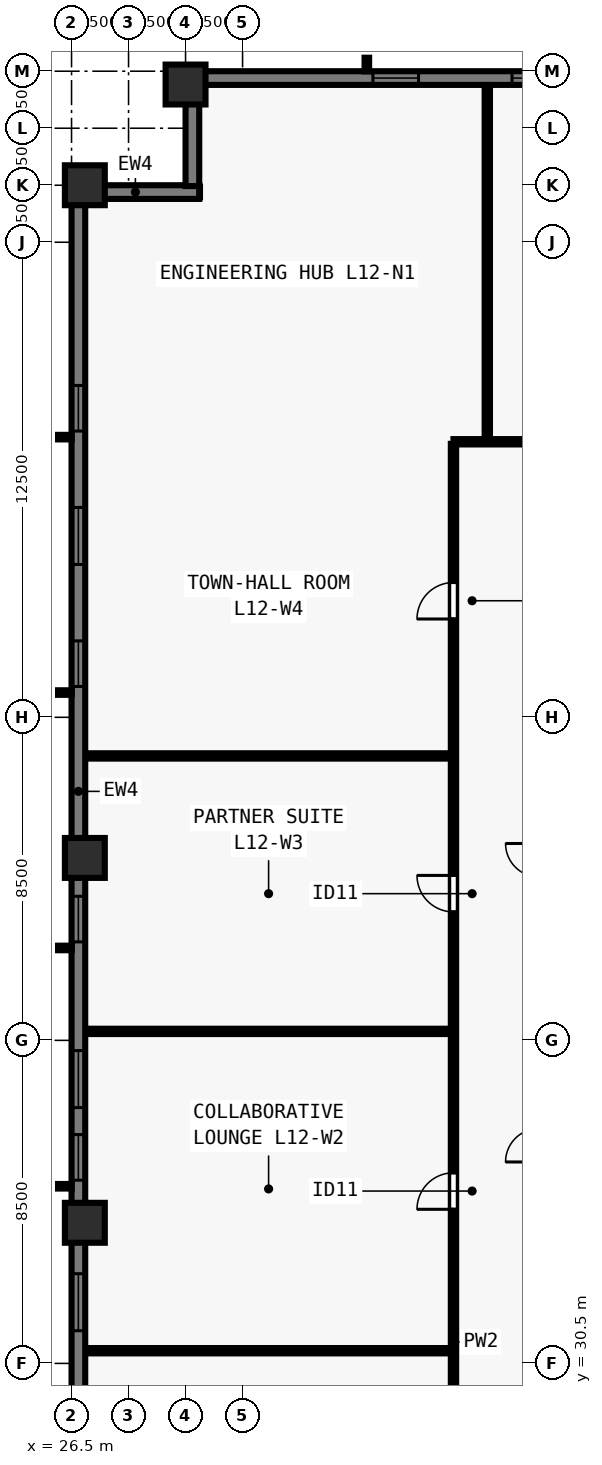
"""IFC4 building model, lengths in metres.
Left out: names, types, materials, properties, quantities, classifications, styles, units other than length and angle.
Written with IfcOpenShell. Run it as: python <this file> out.ifc"""

import sys

from ifc_helpers import new_model, si_unit, direction, frame, frame_2d, origin, origin_2d, place, context, subcontext, project, spatial, rectangle, extrude, element, fill, save


model = new_model("IFC4")
c1 = context("Model", 3, precision=1e-05, world=origin(), true_north=direction((0.0, 1.0)))
c2 = subcontext(c1, "Body", "Model", "MODEL_VIEW")
j1 = project(units=[si_unit("LENGTHUNIT", "METRE"), si_unit("PLANEANGLEUNIT", "RADIAN")], contexts=[c1])
p1 = place(None, origin())
s1 = spatial("IfcSite", under=j1, at=p1, CompositionType="ELEMENT")
p2 = place(p1, origin())
s2 = spatial("IfcBuilding", under=s1, at=p2, CompositionType="ELEMENT")
p3 = place(p2, frame((0.0, 0.0, 48.0)))
s3 = spatial("IfcBuildingStorey", under=s2, at=p3, CompositionType="ELEMENT", Elevation=48.0)
for number, where, z_axis, x_axis in (
    (1, (29.5, 64.15, 0.0), (0.0, 0.0, 1.0), (1.0, 0.0, 0.0)),
    (2, (26.85, 61.5, 0.0), (0.0, 0.0, 1.0), (0.0, 1.0, 0.0)),
    (3, (26.85, 43.8, 0.0), (0.0, 0.0, 1.0), (0.0, 1.0, 0.0)),
    (4, (26.85, 34.2, 0.0), (0.0, 0.0, 1.0), (0.0, 1.0, 0.0)),
):
    element("IfcColumn", number, at=place(p3, frame(where, z_axis=z_axis, x_axis=x_axis)), inside=s3, PredefinedType="COLUMN", context=c2, shape_type="SweptSolid", body=[
        extrude(rectangle(XDim=1.05, YDim=1.05, at=origin_2d()), origin(), (0.0, 0.0, 1.0), 3.5),
    ])
p4 = place(p3, frame((26.68, 16.5, 0.0), z_axis=(0.0, 0.0, 1.0), x_axis=(0.0, 1.0, 0.0)))
e5 = element("IfcWall", 5, at=p4, inside=s3, PredefinedType="SOLIDWALL", context=c2, shape_type="SweptSolid", body=[
    extrude(rectangle(XDim=44.662, YDim=0.36, at=frame_2d((22.331, 0.0))), origin(), (0.0, 0.0, 1.0), 3.28),
])
p5 = place(p4, frame((4.93, 0.0, 0.8)))
e6 = element("IfcOpeningElement", 6, at=p5, cuts=e5, PredefinedType="OPENING", context=c2, shape_type="SweptSolid", body=[
    extrude(rectangle(XDim=1.2, YDim=1.544, at=frame_2d((0.6, 0.772))), frame((0.0, 0.19, 0.0), z_axis=(0.0, -1.0, 0.0), x_axis=(1.0, 0.0, 0.0)), (0.0, 0.0, 1.0), 0.38),
])
p6 = place(p4, frame((8.14, 0.0, 0.8)))
e7 = element("IfcOpeningElement", 7, at=p6, cuts=e5, PredefinedType="OPENING", context=c2, shape_type="SweptSolid", body=[
    extrude(rectangle(XDim=1.5, YDim=1.544, at=frame_2d((0.75, 0.772))), frame((0.0, 0.19, 0.0), z_axis=(0.0, -1.0, 0.0), x_axis=(1.0, 0.0, 0.0)), (0.0, 0.0, 1.0), 0.38),
])
p7 = place(p4, frame((11.65, 0.0, 0.8)))
e8 = element("IfcOpeningElement", 8, at=p7, cuts=e5, PredefinedType="OPENING", context=c2, shape_type="SweptSolid", body=[
    extrude(rectangle(XDim=1.2, YDim=1.544, at=frame_2d((0.6, 0.772))), frame((0.0, 0.19, 0.0), z_axis=(0.0, -1.0, 0.0), x_axis=(1.0, 0.0, 0.0)), (0.0, 0.0, 1.0), 0.38),
])
p8 = place(p4, frame((14.861, 0.0, 0.8)))
e9 = element("IfcOpeningElement", 9, at=p8, cuts=e5, PredefinedType="OPENING", context=c2, shape_type="SweptSolid", body=[
    extrude(rectangle(XDim=1.5, YDim=1.544, at=frame_2d((0.75, 0.772))), frame((0.0, 0.19, 0.0), z_axis=(0.0, -1.0, 0.0), x_axis=(1.0, 0.0, 0.0)), (0.0, 0.0, 1.0), 0.38),
])
p9 = place(p4, frame((18.821, 0.0, 0.8)))
e10 = element("IfcOpeningElement", 10, at=p9, cuts=e5, PredefinedType="OPENING", context=c2, shape_type="SweptSolid", body=[
    extrude(rectangle(XDim=1.2, YDim=1.544, at=frame_2d((0.6, 0.772))), frame((0.0, 0.19, 0.0), z_axis=(0.0, -1.0, 0.0), x_axis=(1.0, 0.0, 0.0)), (0.0, 0.0, 1.0), 0.38),
])
p10 = place(p4, frame((20.731, 0.0, 0.8)))
e11 = element("IfcOpeningElement", 11, at=p10, cuts=e5, PredefinedType="OPENING", context=c2, shape_type="SweptSolid", body=[
    extrude(rectangle(XDim=1.5, YDim=1.544, at=frame_2d((0.75, 0.772))), frame((0.0, 0.19, 0.0), z_axis=(0.0, -1.0, 0.0), x_axis=(1.0, 0.0, 0.0)), (0.0, 0.0, 1.0), 0.38),
])
p11 = place(p4, frame((25.091, 0.0, 0.8)))
e12 = element("IfcOpeningElement", 12, at=p11, cuts=e5, PredefinedType="OPENING", context=c2, shape_type="SweptSolid", body=[
    extrude(rectangle(XDim=1.2, YDim=1.544, at=frame_2d((0.6, 0.772))), frame((0.0, 0.19, 0.0), z_axis=(0.0, -1.0, 0.0), x_axis=(1.0, 0.0, 0.0)), (0.0, 0.0, 1.0), 0.38),
])
p12 = place(p4, frame((31.812, 0.0, 0.8)))
e13 = element("IfcOpeningElement", 13, at=p12, cuts=e5, PredefinedType="OPENING", context=c2, shape_type="SweptSolid", body=[
    extrude(rectangle(XDim=1.2, YDim=1.544, at=frame_2d((0.6, 0.772))), frame((0.0, 0.19, 0.0), z_axis=(0.0, -1.0, 0.0), x_axis=(1.0, 0.0, 0.0)), (0.0, 0.0, 1.0), 0.38),
])
p13 = place(p4, frame((35.022, 0.0, 0.8)))
e14 = element("IfcOpeningElement", 14, at=p13, cuts=e5, PredefinedType="OPENING", context=c2, shape_type="SweptSolid", body=[
    extrude(rectangle(XDim=1.5, YDim=1.544, at=frame_2d((0.75, 0.772))), frame((0.0, 0.19, 0.0), z_axis=(0.0, -1.0, 0.0), x_axis=(1.0, 0.0, 0.0)), (0.0, 0.0, 1.0), 0.38),
])
p14 = place(p4, frame((38.532, 0.0, 0.8)))
e15 = element("IfcOpeningElement", 15, at=p14, cuts=e5, PredefinedType="OPENING", context=c2, shape_type="SweptSolid", body=[
    extrude(rectangle(XDim=1.2, YDim=1.544, at=frame_2d((0.6, 0.772))), frame((0.0, 0.19, 0.0), z_axis=(0.0, -1.0, 0.0), x_axis=(1.0, 0.0, 0.0)), (0.0, 0.0, 1.0), 0.38),
])
p15 = place(p3, frame((26.5, 61.32, 0.0), z_axis=(0.0, 0.0, 1.0), x_axis=(1.0, 0.0, 0.0)))
e16 = element("IfcWall", 16, at=p15, inside=s3, PredefinedType="SOLIDWALL", context=c2, shape_type="SweptSolid", body=[
    extrude(rectangle(XDim=3.36, YDim=0.36, at=frame_2d((1.68, 0.0))), origin(), (0.0, 0.0, 1.0), 3.28),
])
p16 = place(p3, frame((29.68, 61.478, 0.0), z_axis=(0.0, 0.0, 1.0), x_axis=(0.0, 1.0, 0.0)))
e17 = element("IfcWall", 17, at=p16, inside=s3, PredefinedType="SOLIDWALL", context=c2, shape_type="SweptSolid", body=[
    extrude(rectangle(XDim=2.684, YDim=0.36, at=frame_2d((1.342, 0.0))), origin(), (0.0, 0.0, 1.0), 3.28),
])
p17 = place(p3, frame((29.5, 64.32, 0.0), z_axis=(0.0, 0.0, 1.0), x_axis=(1.0, 0.0, 0.0)))
e18 = element("IfcWall", 18, at=p17, inside=s3, PredefinedType="SOLIDWALL", context=c2, shape_type="SweptSolid", body=[
    extrude(rectangle(XDim=44.662, YDim=0.36, at=frame_2d((22.331, 0.0))), origin(), (0.0, 0.0, 1.0), 3.28),
])
p18 = place(p17, frame((4.93, 0.0, 0.8)))
e19 = element("IfcOpeningElement", 19, at=p18, cuts=e18, PredefinedType="OPENING", context=c2, shape_type="SweptSolid", body=[
    extrude(rectangle(XDim=1.2, YDim=1.544, at=frame_2d((0.6, 0.772))), frame((0.0, 0.19, 0.0), z_axis=(0.0, -1.0, 0.0), x_axis=(1.0, 0.0, 0.0)), (0.0, 0.0, 1.0), 0.38),
])
p19 = place(p17, frame((8.59, 0.0, 0.8)))
e20 = element("IfcOpeningElement", 20, at=p19, cuts=e18, PredefinedType="OPENING", context=c2, shape_type="SweptSolid", body=[
    extrude(rectangle(XDim=1.5, YDim=1.544, at=frame_2d((0.75, 0.772))), frame((0.0, 0.19, 0.0), z_axis=(0.0, -1.0, 0.0), x_axis=(1.0, 0.0, 0.0)), (0.0, 0.0, 1.0), 0.38),
])
p20 = place(p17, frame((11.65, 0.0, 0.8)))
e21 = element("IfcOpeningElement", 21, at=p20, cuts=e18, PredefinedType="OPENING", context=c2, shape_type="SweptSolid", body=[
    extrude(rectangle(XDim=1.2, YDim=1.544, at=frame_2d((0.6, 0.772))), frame((0.0, 0.19, 0.0), z_axis=(0.0, -1.0, 0.0), x_axis=(1.0, 0.0, 0.0)), (0.0, 0.0, 1.0), 0.38),
])
p21 = place(p17, frame((14.861, 0.0, 0.8)))
e22 = element("IfcOpeningElement", 22, at=p21, cuts=e18, PredefinedType="OPENING", context=c2, shape_type="SweptSolid", body=[
    extrude(rectangle(XDim=1.5, YDim=1.544, at=frame_2d((0.75, 0.772))), frame((0.0, 0.19, 0.0), z_axis=(0.0, -1.0, 0.0), x_axis=(1.0, 0.0, 0.0)), (0.0, 0.0, 1.0), 0.38),
])
p22 = place(p17, frame((18.821, 0.0, 0.8)))
e23 = element("IfcOpeningElement", 23, at=p22, cuts=e18, PredefinedType="OPENING", context=c2, shape_type="SweptSolid", body=[
    extrude(rectangle(XDim=1.2, YDim=1.544, at=frame_2d((0.6, 0.772))), frame((0.0, 0.19, 0.0), z_axis=(0.0, -1.0, 0.0), x_axis=(1.0, 0.0, 0.0)), (0.0, 0.0, 1.0), 0.38),
])
p23 = place(p17, frame((21.581, 0.0, 0.8)))
e24 = element("IfcOpeningElement", 24, at=p23, cuts=e18, PredefinedType="OPENING", context=c2, shape_type="SweptSolid", body=[
    extrude(rectangle(XDim=1.5, YDim=1.544, at=frame_2d((0.75, 0.772))), frame((0.0, 0.19, 0.0), z_axis=(0.0, -1.0, 0.0), x_axis=(1.0, 0.0, 0.0)), (0.0, 0.0, 1.0), 0.38),
])
p24 = place(p17, frame((25.091, 0.0, 0.8)))
e25 = element("IfcOpeningElement", 25, at=p24, cuts=e18, PredefinedType="OPENING", context=c2, shape_type="SweptSolid", body=[
    extrude(rectangle(XDim=1.2, YDim=1.544, at=frame_2d((0.6, 0.772))), frame((0.0, 0.19, 0.0), z_axis=(0.0, -1.0, 0.0), x_axis=(1.0, 0.0, 0.0)), (0.0, 0.0, 1.0), 0.38),
])
p25 = place(p17, frame((28.751, 0.0, 0.8)))
e26 = element("IfcOpeningElement", 26, at=p25, cuts=e18, PredefinedType="OPENING", context=c2, shape_type="SweptSolid", body=[
    extrude(rectangle(XDim=1.5, YDim=1.544, at=frame_2d((0.75, 0.772))), frame((0.0, 0.19, 0.0), z_axis=(0.0, -1.0, 0.0), x_axis=(1.0, 0.0, 0.0)), (0.0, 0.0, 1.0), 0.38),
])
p26 = place(p17, frame((31.812, 0.0, 0.8)))
e27 = element("IfcOpeningElement", 27, at=p26, cuts=e18, PredefinedType="OPENING", context=c2, shape_type="SweptSolid", body=[
    extrude(rectangle(XDim=1.2, YDim=1.544, at=frame_2d((0.6, 0.772))), frame((0.0, 0.19, 0.0), z_axis=(0.0, -1.0, 0.0), x_axis=(1.0, 0.0, 0.0)), (0.0, 0.0, 1.0), 0.38),
])
p27 = place(p17, frame((35.022, 0.0, 0.8)))
e28 = element("IfcOpeningElement", 28, at=p27, cuts=e18, PredefinedType="OPENING", context=c2, shape_type="SweptSolid", body=[
    extrude(rectangle(XDim=1.5, YDim=1.544, at=frame_2d((0.75, 0.772))), frame((0.0, 0.19, 0.0), z_axis=(0.0, -1.0, 0.0), x_axis=(1.0, 0.0, 0.0)), (0.0, 0.0, 1.0), 0.38),
])
p28 = place(p17, frame((38.532, 0.0, 0.8)))
e29 = element("IfcOpeningElement", 29, at=p28, cuts=e18, PredefinedType="OPENING", context=c2, shape_type="SweptSolid", body=[
    extrude(rectangle(XDim=1.2, YDim=1.544, at=frame_2d((0.6, 0.772))), frame((0.0, 0.19, 0.0), z_axis=(0.0, -1.0, 0.0), x_axis=(1.0, 0.0, 0.0)), (0.0, 0.0, 1.0), 0.38),
])
p29 = place(p3, frame((36.55, 54.75, 0.0), z_axis=(0.0, 0.0, 1.0), x_axis=(1.0, 0.0, 0.0)))
e30 = element("IfcWall", 30, at=p29, inside=s3, PredefinedType="PARTITIONING", context=c2, shape_type="SweptSolid", body=[
    extrude(rectangle(XDim=30.9, YDim=0.14, at=frame_2d((15.45, 0.0))), origin(), (0.0, 0.0, 1.0), 3.28),
])
p30 = place(p29, frame((3.69, 0.0, 0.0)))
e31 = element("IfcOpeningElement", 31, at=p30, cuts=e30, PredefinedType="OPENING", context=c2, shape_type="SweptSolid", body=[
    extrude(rectangle(XDim=0.96, YDim=2.12, at=frame_2d((0.48, 1.06))), frame((0.0, 0.08, 0.0), z_axis=(0.0, -1.0, 0.0), x_axis=(1.0, 0.0, 0.0)), (0.0, 0.0, 1.0), 0.16),
])
p31 = place(p29, frame((5.013, 0.0, 0.0)))
e32 = element("IfcOpeningElement", 32, at=p31, cuts=e30, PredefinedType="OPENING", context=c2, shape_type="SweptSolid", body=[
    extrude(rectangle(XDim=0.96, YDim=2.12, at=frame_2d((0.48, 1.06))), frame((0.0, 0.08, 0.0), z_axis=(0.0, -1.0, 0.0), x_axis=(1.0, 0.0, 0.0)), (0.0, 0.0, 1.0), 0.16),
])
p32 = place(p29, frame((15.045, 0.0, 0.0)))
e33 = element("IfcOpeningElement", 33, at=p32, cuts=e30, PredefinedType="OPENING", context=c2, shape_type="SweptSolid", body=[
    extrude(rectangle(XDim=0.96, YDim=2.12, at=frame_2d((0.48, 1.06))), frame((0.0, 0.08, 0.0), z_axis=(0.0, -1.0, 0.0), x_axis=(1.0, 0.0, 0.0)), (0.0, 0.0, 1.0), 0.16),
])
p33 = place(p29, frame((25.077, 0.0, 0.0)))
e34 = element("IfcOpeningElement", 34, at=p33, cuts=e30, PredefinedType="OPENING", context=c2, shape_type="SweptSolid", body=[
    extrude(rectangle(XDim=0.96, YDim=2.12, at=frame_2d((0.48, 1.06))), frame((0.0, 0.08, 0.0), z_axis=(0.0, -1.0, 0.0), x_axis=(1.0, 0.0, 0.0)), (0.0, 0.0, 1.0), 0.16),
])
p34 = place(p29, frame((28.92, 0.0, 0.0)))
e35 = element("IfcOpeningElement", 35, at=p34, cuts=e30, PredefinedType="OPENING", context=c2, shape_type="SweptSolid", body=[
    extrude(rectangle(XDim=0.96, YDim=2.12, at=frame_2d((0.48, 1.06))), frame((0.0, 0.08, 0.0), z_axis=(0.0, -1.0, 0.0), x_axis=(1.0, 0.0, 0.0)), (0.0, 0.0, 1.0), 0.16),
])
p35 = place(p3, frame((36.55, 23.305, 0.0), z_axis=(0.0, 0.0, 1.0), x_axis=(0.0, 1.0, 0.0)))
e36 = element("IfcWall", 36, at=p35, inside=s3, PredefinedType="PARTITIONING", context=c2, shape_type="SweptSolid", body=[
    extrude(rectangle(XDim=31.39, YDim=0.14, at=frame_2d((15.695, 0.0))), origin(), (0.0, 0.0, 1.0), 3.28),
])
p36 = place(p35, frame((3.307, 0.0, 0.0)))
e37 = element("IfcOpeningElement", 37, at=p36, cuts=e36, PredefinedType="OPENING", context=c2, shape_type="SweptSolid", body=[
    extrude(rectangle(XDim=0.96, YDim=2.12, at=frame_2d((0.48, 1.06))), frame((0.0, 0.08, 0.0), z_axis=(0.0, -1.0, 0.0), x_axis=(1.0, 0.0, 0.0)), (0.0, 0.0, 1.0), 0.16),
])
p37 = place(p35, frame((11.25, 0.0, 0.0)))
e38 = element("IfcOpeningElement", 38, at=p37, cuts=e36, PredefinedType="OPENING", context=c2, shape_type="SweptSolid", body=[
    extrude(rectangle(XDim=0.96, YDim=2.12, at=frame_2d((0.48, 1.06))), frame((0.0, 0.08, 0.0), z_axis=(0.0, -1.0, 0.0), x_axis=(1.0, 0.0, 0.0)), (0.0, 0.0, 1.0), 0.16),
])
p38 = place(p35, frame((19.075, 0.0, 0.0)))
e39 = element("IfcOpeningElement", 39, at=p38, cuts=e36, PredefinedType="OPENING", context=c2, shape_type="SweptSolid", body=[
    extrude(rectangle(XDim=0.96, YDim=2.12, at=frame_2d((0.48, 1.06))), frame((0.0, 0.08, 0.0), z_axis=(0.0, -1.0, 0.0), x_axis=(1.0, 0.0, 0.0)), (0.0, 0.0, 1.0), 0.16),
])
p39 = place(p35, frame((26.782, 0.0, 0.0)))
e40 = element("IfcOpeningElement", 40, at=p39, cuts=e36, PredefinedType="OPENING", context=c2, shape_type="SweptSolid", body=[
    extrude(rectangle(XDim=0.96, YDim=2.12, at=frame_2d((0.48, 1.06))), frame((0.0, 0.08, 0.0), z_axis=(0.0, -1.0, 0.0), x_axis=(1.0, 0.0, 0.0)), (0.0, 0.0, 1.0), 0.16),
])
p40 = place(p3, frame((37.439, 54.85, 0.0), z_axis=(0.0, 0.0, 1.0), x_axis=(0.0, 1.0, 0.0)))
e41 = element("IfcWall", 41, at=p40, inside=s3, PredefinedType="PARTITIONING", context=c2, shape_type="SweptSolid", body=[
    extrude(rectangle(XDim=9.23, YDim=0.14, at=frame_2d((4.615, 0.0))), origin(), (0.0, 0.0, 1.0), 3.28),
])
p41 = place(p3, frame((26.92, 30.834, 0.0), z_axis=(0.0, 0.0, 1.0), x_axis=(1.0, 0.0, 0.0)))
e42 = element("IfcWall", 42, at=p41, inside=s3, PredefinedType="PARTITIONING", context=c2, shape_type="SweptSolid", body=[
    extrude(rectangle(XDim=9.53, YDim=0.14, at=frame_2d((4.765, 0.0))), origin(), (0.0, 0.0, 1.0), 3.28),
])
p42 = place(p3, frame((26.92, 39.236, 0.0), z_axis=(0.0, 0.0, 1.0), x_axis=(1.0, 0.0, 0.0)))
e43 = element("IfcWall", 43, at=p42, inside=s3, PredefinedType="PARTITIONING", context=c2, shape_type="SweptSolid", body=[
    extrude(rectangle(XDim=9.53, YDim=0.14, at=frame_2d((4.765, 0.0))), origin(), (0.0, 0.0, 1.0), 2.849),
])
p43 = place(p3, frame((26.92, 46.484, 0.0), z_axis=(0.0, 0.0, 1.0), x_axis=(1.0, 0.0, 0.0)))
e44 = element("IfcWall", 44, at=p43, inside=s3, PredefinedType="PARTITIONING", context=c2, shape_type="SweptSolid", body=[
    extrude(rectangle(XDim=9.53, YDim=0.14, at=frame_2d((4.765, 0.0))), origin(), (0.0, 0.0, 1.0), 3.28),
])
p44 = place(p8, origin())
e45 = element("IfcWindow", 45, at=p44, inside=s3, PartitioningType="SINGLE_PANEL", PredefinedType="WINDOW", context=c2, shape_type="SweptSolid", body=[
    extrude(rectangle(XDim=1.5, YDim=1.544, at=frame_2d((0.75, 0.772))), frame((0.0, -0.05, 0.0), z_axis=(0.0, -1.0, 0.0), x_axis=(1.0, 0.0, 0.0)), (0.0, 0.0, 1.0), 0.06),
])
fill(e9, e45)
p45 = place(p9, origin())
e46 = element("IfcWindow", 46, at=p45, inside=s3, PartitioningType="SINGLE_PANEL", PredefinedType="WINDOW", context=c2, shape_type="SweptSolid", body=[
    extrude(rectangle(XDim=1.2, YDim=1.544, at=frame_2d((0.6, 0.772))), frame((0.0, -0.05, 0.0), z_axis=(0.0, -1.0, 0.0), x_axis=(1.0, 0.0, 0.0)), (0.0, 0.0, 1.0), 0.06),
])
fill(e10, e46)
p46 = place(p10, origin())
e47 = element("IfcWindow", 47, at=p46, inside=s3, PartitioningType="SINGLE_PANEL", PredefinedType="WINDOW", context=c2, shape_type="SweptSolid", body=[
    extrude(rectangle(XDim=1.5, YDim=1.544, at=frame_2d((0.75, 0.772))), frame((0.0, -0.05, 0.0), z_axis=(0.0, -1.0, 0.0), x_axis=(1.0, 0.0, 0.0)), (0.0, 0.0, 1.0), 0.06),
])
fill(e11, e47)
p47 = place(p11, origin())
e48 = element("IfcWindow", 48, at=p47, inside=s3, PartitioningType="SINGLE_PANEL", PredefinedType="WINDOW", context=c2, shape_type="SweptSolid", body=[
    extrude(rectangle(XDim=1.2, YDim=1.544, at=frame_2d((0.6, 0.772))), frame((0.0, -0.05, 0.0), z_axis=(0.0, -1.0, 0.0), x_axis=(1.0, 0.0, 0.0)), (0.0, 0.0, 1.0), 0.06),
])
fill(e12, e48)
p48 = place(p12, origin())
e49 = element("IfcWindow", 49, at=p48, inside=s3, PartitioningType="SINGLE_PANEL", PredefinedType="WINDOW", context=c2, shape_type="SweptSolid", body=[
    extrude(rectangle(XDim=1.2, YDim=1.544, at=frame_2d((0.6, 0.772))), frame((0.0, -0.05, 0.0), z_axis=(0.0, -1.0, 0.0), x_axis=(1.0, 0.0, 0.0)), (0.0, 0.0, 1.0), 0.06),
])
fill(e13, e49)
p49 = place(p13, origin())
e50 = element("IfcWindow", 50, at=p49, inside=s3, PartitioningType="SINGLE_PANEL", PredefinedType="WINDOW", context=c2, shape_type="SweptSolid", body=[
    extrude(rectangle(XDim=1.5, YDim=1.544, at=frame_2d((0.75, 0.772))), frame((0.0, -0.05, 0.0), z_axis=(0.0, -1.0, 0.0), x_axis=(1.0, 0.0, 0.0)), (0.0, 0.0, 1.0), 0.06),
])
fill(e14, e50)
p50 = place(p14, origin())
e51 = element("IfcWindow", 51, at=p50, inside=s3, PartitioningType="SINGLE_PANEL", PredefinedType="WINDOW", context=c2, shape_type="SweptSolid", body=[
    extrude(rectangle(XDim=1.2, YDim=1.544, at=frame_2d((0.6, 0.772))), frame((0.0, -0.05, 0.0), z_axis=(0.0, -1.0, 0.0), x_axis=(1.0, 0.0, 0.0)), (0.0, 0.0, 1.0), 0.06),
])
fill(e15, e51)
p51 = place(p18, origin())
e52 = element("IfcWindow", 52, at=p51, inside=s3, PartitioningType="SINGLE_PANEL", PredefinedType="WINDOW", context=c2, shape_type="SweptSolid", body=[
    extrude(rectangle(XDim=1.2, YDim=1.544, at=frame_2d((0.6, 0.772))), frame((0.0, -0.05, 0.0), z_axis=(0.0, -1.0, 0.0), x_axis=(1.0, 0.0, 0.0)), (0.0, 0.0, 1.0), 0.06),
])
fill(e19, e52)
p52 = place(p19, origin())
e53 = element("IfcWindow", 53, at=p52, inside=s3, PartitioningType="SINGLE_PANEL", PredefinedType="WINDOW", context=c2, shape_type="SweptSolid", body=[
    extrude(rectangle(XDim=1.5, YDim=1.544, at=frame_2d((0.75, 0.772))), frame((0.0, -0.05, 0.0), z_axis=(0.0, -1.0, 0.0), x_axis=(1.0, 0.0, 0.0)), (0.0, 0.0, 1.0), 0.06),
])
fill(e20, e53)
p53 = place(p37, origin())
e54 = element("IfcDoor", 54, at=p53, inside=s3, OperationType="SINGLE_SWING_LEFT", PredefinedType="DOOR", context=c2, shape_type="SweptSolid", body=[
    extrude(rectangle(XDim=0.96, YDim=2.12, at=frame_2d((0.48, 1.06))), frame((0.0, 0.025, 0.0), z_axis=(0.0, -1.0, 0.0), x_axis=(1.0, 0.0, 0.0)), (0.0, 0.0, 1.0), 0.05),
])
fill(e38, e54)
p54 = place(p38, origin())
e55 = element("IfcDoor", 55, at=p54, inside=s3, OperationType="SINGLE_SWING_RIGHT", PredefinedType="DOOR", context=c2, shape_type="SweptSolid", body=[
    extrude(rectangle(XDim=0.96, YDim=2.12, at=frame_2d((0.48, 1.06))), frame((0.0, 0.025, 0.0), z_axis=(0.0, -1.0, 0.0), x_axis=(1.0, 0.0, 0.0)), (0.0, 0.0, 1.0), 0.05),
])
fill(e39, e55)
p55 = place(p39, origin())
e56 = element("IfcDoor", 56, at=p55, inside=s3, OperationType="SINGLE_SWING_LEFT", PredefinedType="DOOR", context=c2, shape_type="SweptSolid", body=[
    extrude(rectangle(XDim=0.96, YDim=2.12, at=frame_2d((0.48, 1.06))), frame((0.0, 0.025, 0.0), z_axis=(0.0, -1.0, 0.0), x_axis=(1.0, 0.0, 0.0)), (0.0, 0.0, 1.0), 0.05),
])
fill(e40, e56)
save(model, sys.argv[1])
